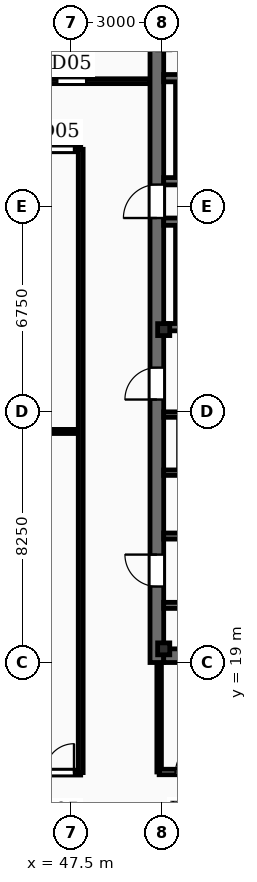
"""IFC4 building model, lengths in metres.
Left out: names, types, materials, properties, quantities, classifications, styles, units other than length and angle.
Written with IfcOpenShell. Run it as: python <this file> out.ifc"""

import sys

from ifc_helpers import new_model, si_unit, direction, frame, frame_2d, origin, origin_2d, place, context, subcontext, project, spatial, rectangle, i_section, extrude, element, fill, save


model = new_model("IFC4")
c1 = context("Model", 3, precision=1e-05, world=origin(), true_north=direction((0.0, 1.0)))
c2 = subcontext(c1, "Body", "Model", "MODEL_VIEW")
j1 = project(units=[si_unit("LENGTHUNIT", "METRE"), si_unit("PLANEANGLEUNIT", "RADIAN")], contexts=[c1])
p1 = place(None, origin())
s1 = spatial("IfcSite", under=j1, at=p1, CompositionType="ELEMENT")
p2 = place(p1, origin())
s2 = spatial("IfcBuilding", under=s1, at=p2, CompositionType="ELEMENT")
p3 = place(p2, frame((0.0, 0.0, 232.2)))
s3 = spatial("IfcBuildingStorey", under=s2, at=p3, CompositionType="ELEMENT", Elevation=232.2)
p4 = place(p3, frame((50.325, 19.0, -0.27), z_axis=(0.0, 0.0, 1.0), x_axis=(0.0, 1.0, 0.0)))
e1 = element("IfcWall", 1, at=p4, inside=s3, PredefinedType="SHEAR", context=c2, shape_type="SweptSolid", body=[
    extrude(rectangle(XDim=20.8, YDim=0.45, at=frame_2d((10.4, 0.0))), origin(), (0.0, 0.0, 1.0), 3.75),
])
p5 = place(p4, frame((2.5, 0.0, 0.27)))
e2 = element("IfcOpeningElement", 2, at=p5, cuts=e1, PredefinedType="OPENING", context=c2, shape_type="SweptSolid", body=[
    extrude(rectangle(XDim=1.05, YDim=2.15, at=frame_2d((0.525, 1.075))), frame((0.0, 0.235, 0.0), z_axis=(0.0, -1.0, 0.0), x_axis=(1.0, 0.0, 0.0)), (0.0, 0.0, 1.0), 0.47),
])
p6 = place(p4, frame((8.65, 0.0, 0.27)))
e3 = element("IfcOpeningElement", 3, at=p6, cuts=e1, PredefinedType="OPENING", context=c2, shape_type="SweptSolid", body=[
    extrude(rectangle(XDim=1.05, YDim=2.15, at=frame_2d((0.525, 1.075))), frame((0.0, 0.235, 0.0), z_axis=(0.0, -1.0, 0.0), x_axis=(1.0, 0.0, 0.0)), (0.0, 0.0, 1.0), 0.47),
])
p7 = place(p4, frame((14.62, 0.0, 0.27)))
e4 = element("IfcOpeningElement", 4, at=p7, cuts=e1, PredefinedType="OPENING", context=c2, shape_type="SweptSolid", body=[
    extrude(rectangle(XDim=1.1, YDim=2.15, at=frame_2d((0.55, 1.075))), frame((0.0, 0.235, 0.0), z_axis=(0.0, -1.0, 0.0), x_axis=(1.0, 0.0, 0.0)), (0.0, 0.0, 1.0), 0.47),
])
p8 = place(p3, frame((50.55, 19.225, -0.27), z_axis=(0.0, 0.0, 1.0), x_axis=(1.0, 0.0, 0.0)))
e5 = element("IfcWall", 5, at=p8, inside=s3, PredefinedType="SHEAR", context=c2, shape_type="SweptSolid", body=[
    extrude(rectangle(XDim=9.8, YDim=0.45, at=frame_2d((4.9, 0.0))), origin(), (0.0, 0.0, 1.0), 3.75),
])
for number, where, z_axis, x_axis in (
    (6, (50.55, 19.45, -0.27), (0.0, 0.0, 1.0), (1.0, 0.0, 0.0)),
    (7, (50.55, 29.95, -0.27), (0.0, 0.0, 1.0), (1.0, 0.0, 0.0)),
):
    element("IfcColumn", number, at=place(p3, frame(where, z_axis=z_axis, x_axis=x_axis)), inside=s3, PredefinedType="COLUMN", context=c2, shape_type="SweptSolid", body=[
        extrude(i_section(OverallWidth=0.399, OverallDepth=0.393, WebThickness=0.023, FlangeThickness=0.037, FilletRadius=0.02, at=origin_2d()), origin(), (0.0, 0.0, 1.0), 3.75),
    ])
p9 = place(p3, frame((60.35, 30.03, 0.0), z_axis=(0.0, 0.0, 1.0), x_axis=(-1.0, 0.0, 0.0)))
e8 = element("IfcWall", 8, at=p9, inside=s3, PredefinedType="SOLIDWALL", context=c2, shape_type="SweptSolid", body=[
    extrude(rectangle(XDim=9.8, YDim=0.24, at=frame_2d((4.9, 0.0))), origin(), (0.0, 0.0, 1.0), 3.48),
])
p10 = place(p9, frame((7.83, 0.0, 0.0)))
e9 = element("IfcOpeningElement", 9, at=p10, cuts=e8, PredefinedType="OPENING", context=c2, shape_type="SweptSolid", body=[
    extrude(rectangle(XDim=1.1, YDim=2.15, at=frame_2d((0.55, 1.075))), frame((0.0, 0.13, 0.0), z_axis=(0.0, -1.0, 0.0), x_axis=(1.0, 0.0, 0.0)), (0.0, 0.0, 1.0), 0.26),
])
p11 = place(p3, frame((50.55, 33.5, 0.0), z_axis=(0.0, 0.0, 1.0), x_axis=(1.0, 0.0, 0.0)))
e10 = element("IfcWall", 10, at=p11, inside=s3, PredefinedType="SOLIDWALL", context=c2, shape_type="SweptSolid", body=[
    extrude(rectangle(XDim=9.8, YDim=0.24, at=frame_2d((4.9, 0.0))), origin(), (0.0, 0.0, 1.0), 3.48),
])
p12 = place(p3, frame((51.06, 30.15, 0.0), z_axis=(0.0, 0.0, 1.0), x_axis=(0.0, 1.0, 0.0)))
e11 = element("IfcWall", 11, at=p12, inside=s3, PredefinedType="SOLIDWALL", context=c2, shape_type="SweptSolid", body=[
    extrude(rectangle(XDim=3.23, YDim=0.24, at=frame_2d((1.615, 0.0))), origin(), (0.0, 0.0, 1.0), 3.48),
])
p13 = place(p3, frame((60.35, 34.83, 0.0), z_axis=(0.0, 0.0, 1.0), x_axis=(-1.0, 0.0, 0.0)))
e12 = element("IfcWall", 12, at=p13, inside=s3, PredefinedType="SOLIDWALL", context=c2, shape_type="SweptSolid", body=[
    extrude(rectangle(XDim=9.8, YDim=0.24, at=frame_2d((4.9, 0.0))), origin(), (0.0, 0.0, 1.0), 3.48),
])
p14 = place(p13, frame((7.87, 0.0, 0.0)))
e13 = element("IfcOpeningElement", 13, at=p14, cuts=e12, PredefinedType="OPENING", context=c2, shape_type="SweptSolid", body=[
    extrude(rectangle(XDim=1.1, YDim=2.15, at=frame_2d((0.55, 1.075))), frame((0.0, 0.13, 0.0), z_axis=(0.0, -1.0, 0.0), x_axis=(1.0, 0.0, 0.0)), (0.0, 0.0, 1.0), 0.26),
])
p15 = place(p3, frame((50.55, 38.22, 0.0), z_axis=(0.0, 0.0, 1.0), x_axis=(1.0, 0.0, 0.0)))
e14 = element("IfcWall", 14, at=p15, inside=s3, PredefinedType="SOLIDWALL", context=c2, shape_type="SweptSolid", body=[
    extrude(rectangle(XDim=9.8, YDim=0.24, at=frame_2d((4.9, 0.0))), origin(), (0.0, 0.0, 1.0), 3.48),
])
p16 = place(p3, frame((51.06, 34.95, 0.0), z_axis=(0.0, 0.0, 1.0), x_axis=(0.0, 1.0, 0.0)))
e15 = element("IfcWall", 15, at=p16, inside=s3, PredefinedType="SOLIDWALL", context=c2, shape_type="SweptSolid", body=[
    extrude(rectangle(XDim=3.15, YDim=0.24, at=frame_2d((1.575, 0.0))), origin(), (0.0, 0.0, 1.0), 3.48),
])
p17 = place(p3, frame((50.55, 27.155, 0.0), z_axis=(0.0, 0.0, 1.0), x_axis=(1.0, 0.0, 0.0)))
e16 = element("IfcWall", 16, at=p17, inside=s3, PredefinedType="SOLIDWALL", context=c2, shape_type="SweptSolid", body=[
    extrude(rectangle(XDim=3.315, YDim=0.18, at=frame_2d((1.657, 0.0))), origin(), (0.0, 0.0, 1.0), 3.48),
])
p18 = place(p17, frame((1.235, 0.0, 0.0)))
e17 = element("IfcOpeningElement", 17, at=p18, cuts=e16, PredefinedType="OPENING", context=c2, shape_type="SweptSolid", body=[
    extrude(rectangle(XDim=1.35, YDim=2.3, at=frame_2d((0.675, 1.15))), frame((0.0, 0.1, 0.0), z_axis=(0.0, -1.0, 0.0), x_axis=(1.0, 0.0, 0.0)), (0.0, 0.0, 1.0), 0.2),
])
p19 = place(p3, frame((50.55, 25.245, 0.0), z_axis=(0.0, 0.0, 1.0), x_axis=(1.0, 0.0, 0.0)))
e18 = element("IfcWall", 18, at=p19, inside=s3, PredefinedType="SOLIDWALL", context=c2, shape_type="SweptSolid", body=[
    extrude(rectangle(XDim=3.315, YDim=0.18, at=frame_2d((1.657, 0.0))), origin(), (0.0, 0.0, 1.0), 3.48),
])
p20 = place(p3, frame((50.55, 20.88, 0.0), z_axis=(0.0, 0.0, 1.0), x_axis=(1.0, 0.0, 0.0)))
e19 = element("IfcWall", 19, at=p20, inside=s3, PredefinedType="SOLIDWALL", context=c2, shape_type="SweptSolid", body=[
    extrude(rectangle(XDim=9.8, YDim=0.2, at=frame_2d((4.9, 0.0))), origin(), (0.0, 0.0, 1.0), 2.54),
])
p21 = place(p20, frame((1.4, 0.0, 0.0)))
e20 = element("IfcOpeningElement", 20, at=p21, cuts=e19, PredefinedType="OPENING", context=c2, shape_type="SweptSolid", body=[
    extrude(rectangle(XDim=1.05, YDim=2.15, at=frame_2d((0.525, 1.075))), frame((0.0, 0.11, 0.0), z_axis=(0.0, -1.0, 0.0), x_axis=(1.0, 0.0, 0.0)), (0.0, 0.0, 1.0), 0.22),
])
p22 = place(p20, frame((5.5, 0.0, 0.0)))
e21 = element("IfcOpeningElement", 21, at=p22, cuts=e19, PredefinedType="OPENING", context=c2, shape_type="SweptSolid", body=[
    extrude(rectangle(XDim=1.05, YDim=2.15, at=frame_2d((0.525, 1.075))), frame((0.0, 0.11, 0.0), z_axis=(0.0, -1.0, 0.0), x_axis=(1.0, 0.0, 0.0)), (0.0, 0.0, 1.0), 0.22),
])
p23 = place(p3, frame((50.55, 23.16, 0.0), z_axis=(0.0, 0.0, 1.0), x_axis=(1.0, 0.0, 0.0)))
e22 = element("IfcWall", 22, at=p23, inside=s3, PredefinedType="SOLIDWALL", context=c2, shape_type="SweptSolid", body=[
    extrude(rectangle(XDim=3.33, YDim=0.2, at=frame_2d((1.665, 0.0))), origin(), (0.0, 0.0, 1.0), 2.54),
])
p24 = place(p23, frame((0.55, 0.0, 0.0)))
e23 = element("IfcOpeningElement", 23, at=p24, cuts=e22, PredefinedType="OPENING", context=c2, shape_type="SweptSolid", body=[
    extrude(rectangle(XDim=0.86, YDim=2.05, at=frame_2d((0.43, 1.025))), frame((0.0, 0.11, 0.0), z_axis=(0.0, -1.0, 0.0), x_axis=(1.0, 0.0, 0.0)), (0.0, 0.0, 1.0), 0.22),
])
p25 = place(p3, frame((50.4, 15.4, 0.0), z_axis=(0.0, 0.0, 1.0), x_axis=(1.0, 0.0, 0.0)))
e24 = element("IfcWall", 24, at=p25, inside=s3, PredefinedType="SOLIDWALL", context=c2, shape_type="SweptSolid", body=[
    extrude(rectangle(XDim=10.0, YDim=0.18, at=frame_2d((5.0, 0.0))), origin(), (0.0, 0.0, 1.0), 2.54),
])
p26 = place(p25, frame((0.54, 0.0, 0.0)))
e25 = element("IfcOpeningElement", 25, at=p26, cuts=e24, PredefinedType="OPENING", context=c2, shape_type="SweptSolid", body=[
    extrude(rectangle(XDim=0.92, YDim=2.1, at=frame_2d((0.46, 1.05))), frame((0.0, 0.1, 0.0), z_axis=(0.0, -1.0, 0.0), x_axis=(1.0, 0.0, 0.0)), (0.0, 0.0, 1.0), 0.2),
])
p27 = place(p25, frame((2.54, 0.0, 0.0)))
e26 = element("IfcOpeningElement", 26, at=p27, cuts=e24, PredefinedType="OPENING", context=c2, shape_type="SweptSolid", body=[
    extrude(rectangle(XDim=0.92, YDim=2.1, at=frame_2d((0.46, 1.05))), frame((0.0, 0.1, 0.0), z_axis=(0.0, -1.0, 0.0), x_axis=(1.0, 0.0, 0.0)), (0.0, 0.0, 1.0), 0.2),
])
p28 = place(p25, frame((4.54, 0.0, 0.0)))
e27 = element("IfcOpeningElement", 27, at=p28, cuts=e24, PredefinedType="OPENING", context=c2, shape_type="SweptSolid", body=[
    extrude(rectangle(XDim=0.92, YDim=2.1, at=frame_2d((0.46, 1.05))), frame((0.0, 0.1, 0.0), z_axis=(0.0, -1.0, 0.0), x_axis=(1.0, 0.0, 0.0)), (0.0, 0.0, 1.0), 0.2),
])
p29 = place(p25, frame((6.54, 0.0, 0.0)))
e28 = element("IfcOpeningElement", 28, at=p29, cuts=e24, PredefinedType="OPENING", context=c2, shape_type="SweptSolid", body=[
    extrude(rectangle(XDim=0.92, YDim=2.1, at=frame_2d((0.46, 1.05))), frame((0.0, 0.1, 0.0), z_axis=(0.0, -1.0, 0.0), x_axis=(1.0, 0.0, 0.0)), (0.0, 0.0, 1.0), 0.2),
])
p30 = place(p25, frame((8.57, 0.0, 0.0)))
e29 = element("IfcOpeningElement", 29, at=p30, cuts=e24, PredefinedType="OPENING", context=c2, shape_type="SweptSolid", body=[
    extrude(rectangle(XDim=0.86, YDim=2.05, at=frame_2d((0.43, 1.025))), frame((0.0, 0.1, 0.0), z_axis=(0.0, -1.0, 0.0), x_axis=(1.0, 0.0, 0.0)), (0.0, 0.0, 1.0), 0.2),
])
p31 = place(p3, frame((50.4, 15.4, 0.0), z_axis=(0.0, 0.0, 1.0), x_axis=(0.0, 1.0, 0.0)))
e30 = element("IfcWall", 30, at=p31, inside=s3, PredefinedType="PARTITIONING", context=c2, shape_type="SweptSolid", body=[
    extrude(rectangle(XDim=3.58, YDim=0.15, at=frame_2d((1.79, 0.0))), origin(), (0.0, 0.0, 1.0), 2.54),
])
p32 = place(p3, frame((24.82, 38.12, 0.0), z_axis=(0.0, 0.0, 1.0), x_axis=(1.0, 0.0, 0.0)))
e31 = element("IfcWall", 31, at=p32, inside=s3, PredefinedType="PARTITIONING", context=c2, shape_type="SweptSolid", body=[
    extrude(rectangle(XDim=25.26, YDim=0.16, at=frame_2d((12.63, 0.0))), origin(), (0.0, 0.0, 1.0), 2.54),
])
p33 = place(p32, frame((1.88, 0.0, 0.0)))
e32 = element("IfcOpeningElement", 32, at=p33, cuts=e31, PredefinedType="OPENING", context=c2, shape_type="SweptSolid", body=[
    extrude(rectangle(XDim=0.95, YDim=2.15, at=frame_2d((0.475, 1.075))), frame((0.0, 0.09, 0.0), z_axis=(0.0, -1.0, 0.0), x_axis=(1.0, 0.0, 0.0)), (0.0, 0.0, 1.0), 0.18),
])
p34 = place(p32, frame((7.555, 0.0, 0.0)))
e33 = element("IfcOpeningElement", 33, at=p34, cuts=e31, PredefinedType="OPENING", context=c2, shape_type="SweptSolid", body=[
    extrude(rectangle(XDim=0.95, YDim=2.15, at=frame_2d((0.475, 1.075))), frame((0.0, 0.09, 0.0), z_axis=(0.0, -1.0, 0.0), x_axis=(1.0, 0.0, 0.0)), (0.0, 0.0, 1.0), 0.18),
])
p35 = place(p32, frame((11.855, 0.0, 0.0)))
e34 = element("IfcOpeningElement", 34, at=p35, cuts=e31, PredefinedType="OPENING", context=c2, shape_type="SweptSolid", body=[
    extrude(rectangle(XDim=0.95, YDim=2.15, at=frame_2d((0.475, 1.075))), frame((0.0, 0.09, 0.0), z_axis=(0.0, -1.0, 0.0), x_axis=(1.0, 0.0, 0.0)), (0.0, 0.0, 1.0), 0.18),
])
p36 = place(p32, frame((16.855, 0.0, 0.0)))
e35 = element("IfcOpeningElement", 35, at=p36, cuts=e31, PredefinedType="OPENING", context=c2, shape_type="SweptSolid", body=[
    extrude(rectangle(XDim=0.95, YDim=2.15, at=frame_2d((0.475, 1.075))), frame((0.0, 0.09, 0.0), z_axis=(0.0, -1.0, 0.0), x_axis=(1.0, 0.0, 0.0)), (0.0, 0.0, 1.0), 0.18),
])
p37 = place(p32, frame((22.23, 0.0, 0.0)))
e36 = element("IfcOpeningElement", 36, at=p37, cuts=e31, PredefinedType="OPENING", context=c2, shape_type="SweptSolid", body=[
    extrude(rectangle(XDim=0.95, YDim=2.15, at=frame_2d((0.475, 1.075))), frame((0.0, 0.09, 0.0), z_axis=(0.0, -1.0, 0.0), x_axis=(1.0, 0.0, 0.0)), (0.0, 0.0, 1.0), 0.18),
])
p38 = place(p3, frame((27.08, 26.6, 0.0), z_axis=(0.0, 0.0, 1.0), x_axis=(1.0, 0.0, 0.0)))
e37 = element("IfcWall", 37, at=p38, inside=s3, PredefinedType="PARTITIONING", context=c2, shape_type="SweptSolid", body=[
    extrude(rectangle(XDim=20.74, YDim=0.135, at=frame_2d((10.37, 0.0))), origin(), (0.0, 0.0, 1.0), 2.54),
])
p39 = place(p3, frame((27.08, 35.88, 0.0), z_axis=(0.0, 0.0, 1.0), x_axis=(1.0, 0.0, 0.0)))
e38 = element("IfcWall", 38, at=p39, inside=s3, PredefinedType="PARTITIONING", context=c2, shape_type="SweptSolid", body=[
    extrude(rectangle(XDim=20.74, YDim=0.16, at=frame_2d((10.37, 0.0))), origin(), (0.0, 0.0, 1.0), 2.54),
])
p40 = place(p39, frame((0.895, 0.0, 0.0)))
e39 = element("IfcOpeningElement", 39, at=p40, cuts=e38, PredefinedType="OPENING", context=c2, shape_type="SweptSolid", body=[
    extrude(rectangle(XDim=0.95, YDim=2.15, at=frame_2d((0.475, 1.075))), frame((0.0, 0.09, 0.0), z_axis=(0.0, -1.0, 0.0), x_axis=(1.0, 0.0, 0.0)), (0.0, 0.0, 1.0), 0.18),
])
p41 = place(p39, frame((5.295, 0.0, 0.0)))
e40 = element("IfcOpeningElement", 40, at=p41, cuts=e38, PredefinedType="OPENING", context=c2, shape_type="SweptSolid", body=[
    extrude(rectangle(XDim=0.95, YDim=2.15, at=frame_2d((0.475, 1.075))), frame((0.0, 0.09, 0.0), z_axis=(0.0, -1.0, 0.0), x_axis=(1.0, 0.0, 0.0)), (0.0, 0.0, 1.0), 0.18),
])
p42 = place(p39, frame((9.295, 0.0, 0.0)))
e41 = element("IfcOpeningElement", 41, at=p42, cuts=e38, PredefinedType="OPENING", context=c2, shape_type="SweptSolid", body=[
    extrude(rectangle(XDim=0.95, YDim=2.15, at=frame_2d((0.475, 1.075))), frame((0.0, 0.09, 0.0), z_axis=(0.0, -1.0, 0.0), x_axis=(1.0, 0.0, 0.0)), (0.0, 0.0, 1.0), 0.18),
])
p43 = place(p39, frame((13.945, 0.0, 0.0)))
e42 = element("IfcOpeningElement", 42, at=p43, cuts=e38, PredefinedType="OPENING", context=c2, shape_type="SweptSolid", body=[
    extrude(rectangle(XDim=0.95, YDim=2.15, at=frame_2d((0.475, 1.075))), frame((0.0, 0.09, 0.0), z_axis=(0.0, -1.0, 0.0), x_axis=(1.0, 0.0, 0.0)), (0.0, 0.0, 1.0), 0.18),
])
p44 = place(p39, frame((17.445, 0.0, 0.0)))
e43 = element("IfcOpeningElement", 43, at=p44, cuts=e38, PredefinedType="OPENING", context=c2, shape_type="SweptSolid", body=[
    extrude(rectangle(XDim=0.95, YDim=2.15, at=frame_2d((0.475, 1.075))), frame((0.0, 0.09, 0.0), z_axis=(0.0, -1.0, 0.0), x_axis=(1.0, 0.0, 0.0)), (0.0, 0.0, 1.0), 0.18),
])
p45 = place(p39, frame((19.57, 0.0, 0.0)))
e44 = element("IfcOpeningElement", 44, at=p45, cuts=e38, PredefinedType="OPENING", context=c2, shape_type="SweptSolid", body=[
    extrude(rectangle(XDim=0.95, YDim=2.15, at=frame_2d((0.475, 1.075))), frame((0.0, 0.09, 0.0), z_axis=(0.0, -1.0, 0.0), x_axis=(1.0, 0.0, 0.0)), (0.0, 0.0, 1.0), 0.18),
])
p46 = place(p3, frame((27.08, 15.38, 0.0), z_axis=(0.0, 0.0, 1.0), x_axis=(1.0, 0.0, 0.0)))
e45 = element("IfcWall", 45, at=p46, inside=s3, PredefinedType="PARTITIONING", context=c2, shape_type="SweptSolid", body=[
    extrude(rectangle(XDim=20.74, YDim=0.16, at=frame_2d((10.37, 0.0))), origin(), (0.0, 0.0, 1.0), 2.54),
])
p47 = place(p46, frame((0.895, 0.0, 0.0)))
e46 = element("IfcOpeningElement", 46, at=p47, cuts=e45, PredefinedType="OPENING", context=c2, shape_type="SweptSolid", body=[
    extrude(rectangle(XDim=0.95, YDim=2.15, at=frame_2d((0.475, 1.075))), frame((0.0, 0.09, 0.0), z_axis=(0.0, -1.0, 0.0), x_axis=(1.0, 0.0, 0.0)), (0.0, 0.0, 1.0), 0.18),
])
p48 = place(p46, frame((5.295, 0.0, 0.0)))
e47 = element("IfcOpeningElement", 47, at=p48, cuts=e45, PredefinedType="OPENING", context=c2, shape_type="SweptSolid", body=[
    extrude(rectangle(XDim=0.95, YDim=2.15, at=frame_2d((0.475, 1.075))), frame((0.0, 0.09, 0.0), z_axis=(0.0, -1.0, 0.0), x_axis=(1.0, 0.0, 0.0)), (0.0, 0.0, 1.0), 0.18),
])
p49 = place(p46, frame((9.295, 0.0, 0.0)))
e48 = element("IfcOpeningElement", 48, at=p49, cuts=e45, PredefinedType="OPENING", context=c2, shape_type="SweptSolid", body=[
    extrude(rectangle(XDim=0.95, YDim=2.15, at=frame_2d((0.475, 1.075))), frame((0.0, 0.09, 0.0), z_axis=(0.0, -1.0, 0.0), x_axis=(1.0, 0.0, 0.0)), (0.0, 0.0, 1.0), 0.18),
])
p50 = place(p46, frame((13.945, 0.0, 0.0)))
e49 = element("IfcOpeningElement", 49, at=p50, cuts=e45, PredefinedType="OPENING", context=c2, shape_type="SweptSolid", body=[
    extrude(rectangle(XDim=0.95, YDim=2.15, at=frame_2d((0.475, 1.075))), frame((0.0, 0.09, 0.0), z_axis=(0.0, -1.0, 0.0), x_axis=(1.0, 0.0, 0.0)), (0.0, 0.0, 1.0), 0.18),
])
p51 = place(p46, frame((17.445, 0.0, 0.0)))
e50 = element("IfcOpeningElement", 50, at=p51, cuts=e45, PredefinedType="OPENING", context=c2, shape_type="SweptSolid", body=[
    extrude(rectangle(XDim=0.95, YDim=2.15, at=frame_2d((0.475, 1.075))), frame((0.0, 0.09, 0.0), z_axis=(0.0, -1.0, 0.0), x_axis=(1.0, 0.0, 0.0)), (0.0, 0.0, 1.0), 0.18),
])
p52 = place(p46, frame((19.57, 0.0, 0.0)))
e51 = element("IfcOpeningElement", 51, at=p52, cuts=e45, PredefinedType="OPENING", context=c2, shape_type="SweptSolid", body=[
    extrude(rectangle(XDim=0.95, YDim=2.15, at=frame_2d((0.475, 1.075))), frame((0.0, 0.09, 0.0), z_axis=(0.0, -1.0, 0.0), x_axis=(1.0, 0.0, 0.0)), (0.0, 0.0, 1.0), 0.18),
])
p53 = place(p3, frame((47.82, 15.38, 0.0), z_axis=(0.0, 0.0, 1.0), x_axis=(0.0, 1.0, 0.0)))
e52 = element("IfcWall", 52, at=p53, inside=s3, PredefinedType="PARTITIONING", context=c2, shape_type="SweptSolid", body=[
    extrude(rectangle(XDim=20.5, YDim=0.16, at=frame_2d((10.25, 0.0))), origin(), (0.0, 0.0, 1.0), 2.54),
])
p54 = place(p5, origin())
e53 = element("IfcDoor", 53, at=p54, inside=s3, OperationType="SINGLE_SWING_RIGHT", PredefinedType="DOOR", context=c2, shape_type="SweptSolid", body=[
    extrude(rectangle(XDim=1.05, YDim=2.15, at=frame_2d((0.525, 1.075))), frame((0.0, 0.025, 0.0), z_axis=(0.0, -1.0, 0.0), x_axis=(1.0, 0.0, 0.0)), (0.0, 0.0, 1.0), 0.05),
])
fill(e2, e53)
p55 = place(p6, origin())
e54 = element("IfcDoor", 54, at=p55, inside=s3, OperationType="SINGLE_SWING_LEFT", PredefinedType="DOOR", context=c2, shape_type="SweptSolid", body=[
    extrude(rectangle(XDim=1.05, YDim=2.15, at=frame_2d((0.525, 1.075))), frame((0.0, 0.025, 0.0), z_axis=(0.0, -1.0, 0.0), x_axis=(1.0, 0.0, 0.0)), (0.0, 0.0, 1.0), 0.05),
])
fill(e3, e54)
p56 = place(p7, origin())
e55 = element("IfcDoor", 55, at=p56, inside=s3, OperationType="SINGLE_SWING_LEFT", PredefinedType="DOOR", context=c2, shape_type="SweptSolid", body=[
    extrude(rectangle(XDim=1.1, YDim=2.15, at=frame_2d((0.55, 1.075))), frame((0.0, 0.025, 0.0), z_axis=(0.0, -1.0, 0.0), x_axis=(1.0, 0.0, 0.0)), (0.0, 0.0, 1.0), 0.05),
])
fill(e4, e55)
p57 = place(p26, origin())
e56 = element("IfcDoor", 56, at=p57, inside=s3, OperationType="SINGLE_SWING_RIGHT", PredefinedType="DOOR", context=c2, shape_type="SweptSolid", body=[
    extrude(rectangle(XDim=0.92, YDim=2.1, at=frame_2d((0.46, 1.05))), frame((0.0, 0.025, 0.0), z_axis=(0.0, -1.0, 0.0), x_axis=(1.0, 0.0, 0.0)), (0.0, 0.0, 1.0), 0.05),
])
fill(e25, e56)
p58 = place(p37, origin())
e57 = element("IfcDoor", 57, at=p58, inside=s3, OperationType="SINGLE_SWING_RIGHT", PredefinedType="DOOR", context=c2, shape_type="SweptSolid", body=[
    extrude(rectangle(XDim=0.95, YDim=2.15, at=frame_2d((0.475, 1.075))), frame((0.0, 0.025, 0.0), z_axis=(0.0, -1.0, 0.0), x_axis=(1.0, 0.0, 0.0)), (0.0, 0.0, 1.0), 0.05),
])
fill(e36, e57)
p59 = place(p45, origin())
e58 = element("IfcDoor", 58, at=p59, inside=s3, OperationType="SINGLE_SWING_LEFT", PredefinedType="DOOR", context=c2, shape_type="SweptSolid", body=[
    extrude(rectangle(XDim=0.95, YDim=2.15, at=frame_2d((0.475, 1.075))), frame((0.0, 0.025, 0.0), z_axis=(0.0, -1.0, 0.0), x_axis=(1.0, 0.0, 0.0)), (0.0, 0.0, 1.0), 0.05),
])
fill(e44, e58)
p60 = place(p52, origin())
e59 = element("IfcDoor", 59, at=p60, inside=s3, OperationType="SINGLE_SWING_RIGHT", PredefinedType="DOOR", context=c2, shape_type="SweptSolid", body=[
    extrude(rectangle(XDim=0.95, YDim=2.15, at=frame_2d((0.475, 1.075))), frame((0.0, 0.025, 0.0), z_axis=(0.0, -1.0, 0.0), x_axis=(1.0, 0.0, 0.0)), (0.0, 0.0, 1.0), 0.05),
])
fill(e51, e59)
save(model, sys.argv[1])
